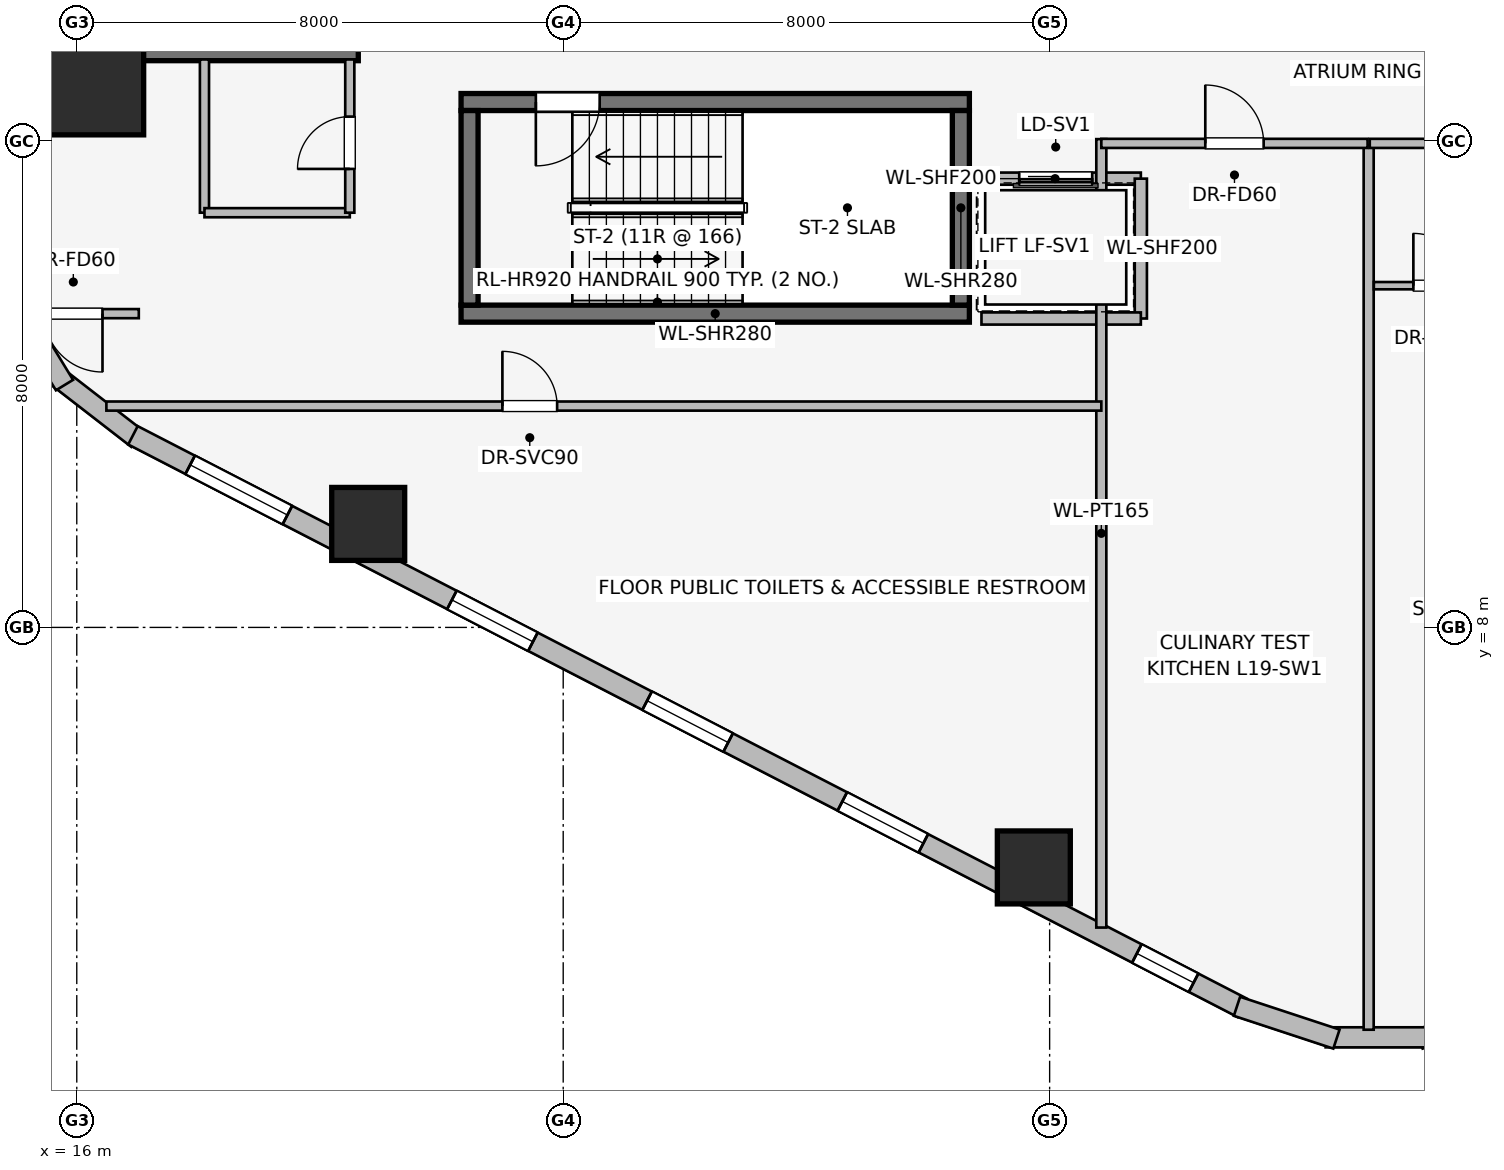
"""IFC4 building model, lengths in metres.
Left out: names, types, materials, properties, quantities, classifications, styles, units other than length and angle.
Written with IfcOpenShell. Run it as: python <this file> out.ifc"""

import sys

from ifc_helpers import new_model, si_unit, direction, frame, frame_2d, origin, origin_2d, place, context, subcontext, project, spatial, rectangle, extrude, element, fill, save


model = new_model("IFC4")
c1 = context("Model", 3, precision=1e-05, world=origin(), true_north=direction((0.0, 1.0)))
c2 = subcontext(c1, "Body", "Model", "MODEL_VIEW")
j1 = project(units=[si_unit("LENGTHUNIT", "METRE"), si_unit("PLANEANGLEUNIT", "RADIAN")], contexts=[c1])
p1 = place(None, origin())
s1 = spatial("IfcSite", under=j1, at=p1, CompositionType="ELEMENT")
p2 = place(p1, origin())
s2 = spatial("IfcBuilding", under=s1, at=p2, CompositionType="ELEMENT")
p3 = place(p2, frame((0.0, 0.0, 74.45)))
s3 = spatial("IfcBuildingStorey", under=s2, at=p3, CompositionType="ELEMENT", Elevation=74.45)
p4 = place(p3, frame((16.87, 17.46, 0.0), z_axis=(0.0, 0.0, 1.0), x_axis=(1.0, 0.0, 0.0)))
e1 = element("IfcWall", 1, at=p4, inside=s3, PredefinedType="SHEAR", context=c2, shape_type="SweptSolid", body=[
    extrude(rectangle(XDim=3.76, YDim=0.28, at=frame_2d((1.88, 0.0))), origin(), (0.0, 0.0, 1.0), 3.65),
])
p5 = place(p3, frame((22.32, 13.16, 0.0), z_axis=(0.0, 0.0, 1.0), x_axis=(1.0, 0.0, 0.0)))
e2 = element("IfcWall", 2, at=p5, inside=s3, PredefinedType="SHEAR", context=c2, shape_type="SweptSolid", body=[
    extrude(rectangle(XDim=8.36, YDim=0.28, at=frame_2d((4.18, 0.0))), origin(), (0.0, 0.0, 1.0), 3.65),
])
p6 = place(p3, frame((30.68, 16.64, 0.0), z_axis=(0.0, 0.0, 1.0), x_axis=(-1.0, 0.0, 0.0)))
e3 = element("IfcWall", 3, at=p6, inside=s3, PredefinedType="SHEAR", context=c2, shape_type="SweptSolid", body=[
    extrude(rectangle(XDim=8.36, YDim=0.28, at=frame_2d((4.18, 0.0))), origin(), (0.0, 0.0, 1.0), 3.65),
])
p7 = place(p6, frame((6.08, 0.0, 0.0)))
e4 = element("IfcOpeningElement", 4, at=p7, cuts=e3, PredefinedType="OPENING", context=c2, shape_type="SweptSolid", body=[
    extrude(rectangle(XDim=1.05, YDim=2.0, at=frame_2d((0.525, 1.0))), frame((0.0, 0.15, 0.0), z_axis=(0.0, -1.0, 0.0), x_axis=(1.0, 0.0, 0.0)), (0.0, 0.0, 1.0), 0.3),
])
for number, where, z_axis, x_axis in (
    (5, (22.46, 16.5, 0.0), (0.0, 0.0, 1.0), (0.0, -1.0, 0.0)),
    (6, (30.54, 13.3, 0.0), (0.0, 0.0, 1.0), (0.0, 1.0, 0.0)),
):
    element("IfcWall", number, at=place(p3, frame(where, z_axis=z_axis, x_axis=x_axis)), inside=s3, PredefinedType="SHEAR", context=c2, shape_type="SweptSolid", body=[
        extrude(rectangle(XDim=3.2, YDim=0.28, at=frame_2d((1.6, 0.0))), origin(), (0.0, 0.0, 1.0), 3.65),
    ])
p8 = place(p3, frame((16.3, 16.9, 0.0), z_axis=(0.0, 0.0, 1.0), x_axis=(1.0, 0.0, 0.0)))
e7 = element("IfcColumn", 7, at=p8, inside=s3, PredefinedType="COLUMN", context=c2, shape_type="SweptSolid", body=[
    extrude(rectangle(XDim=1.6, YDim=1.6, at=origin_2d()), origin(), (0.0, 0.0, 1.0), 3.65),
])
for number, where, z_axis, x_axis in (
    (8, (20.793, 9.702, 0.0), (0.0, 0.0, 1.0), (1.0, 0.0, 0.0)),
    (9, (31.74, 4.053, 0.0), (0.0, 0.0, 1.0), (1.0, 0.0, 0.0)),
):
    element("IfcColumn", number, at=place(p3, frame(where, z_axis=z_axis, x_axis=x_axis)), inside=s3, PredefinedType="COLUMN", context=c2, shape_type="SweptSolid", body=[
        extrude(rectangle(XDim=1.2, YDim=1.2, at=origin_2d()), origin(), (0.0, 0.0, 1.0), 3.65),
    ])
p9 = place(p3, frame((16.998, 11.099, 0.0), z_axis=(0.0, 0.0, 1.0), x_axis=(-0.790691856293, 0.61221433207, 0.0)))
e10 = element("IfcWall", 10, at=p9, inside=s3, PredefinedType="STANDARD", context=c2, shape_type="SweptSolid", body=[
    extrude(rectangle(XDim=1.676, YDim=0.33, at=frame_2d((0.838, 0.0))), origin(), (0.0, 0.0, 1.0), 3.39),
])
p10 = place(p3, frame((15.798, 11.985, 0.0), z_axis=(0.0, 0.0, 1.0), x_axis=(-0.520584129191, 0.853810379671, 0.0)))
e11 = element("IfcWall", 11, at=p10, inside=s3, PredefinedType="STANDARD", context=c2, shape_type="SweptSolid", body=[
    extrude(rectangle(XDim=1.677, YDim=0.33, at=frame_2d((0.838, 0.0))), origin(), (0.0, 0.0, 1.0), 3.39),
])
p11 = place(p3, frame((35.169, 1.743, 0.0), z_axis=(0.0, 0.0, 1.0), x_axis=(-0.888634413993, 0.458616264721, 0.0)))
e12 = element("IfcWall", 12, at=p11, inside=s3, PredefinedType="STANDARD", context=c2, shape_type="SweptSolid", body=[
    extrude(rectangle(XDim=20.531, YDim=0.34, at=frame_2d((10.266, 0.0))), origin(), (0.0, 0.0, 1.0), 2.684),
])
p12 = place(p11, frame((0.902, 0.0, 0.75)))
e13 = element("IfcOpeningElement", 13, at=p12, cuts=e12, PredefinedType="OPENING", context=c2, shape_type="SweptSolid", body=[
    extrude(rectangle(XDim=1.05, YDim=1.4, at=frame_2d((0.525, 0.7))), frame((0.0, 0.18, 0.0), z_axis=(0.0, -1.0, 0.0), x_axis=(1.0, 0.0, 0.0)), (0.0, 0.0, 1.0), 0.36),
])
p13 = place(p11, frame((5.903, 0.0, 0.75)))
e14 = element("IfcOpeningElement", 14, at=p13, cuts=e12, PredefinedType="OPENING", context=c2, shape_type="SweptSolid", body=[
    extrude(rectangle(XDim=1.5, YDim=1.5, at=frame_2d((0.75, 0.75))), frame((0.0, 0.18, 0.0), z_axis=(0.0, -1.0, 0.0), x_axis=(1.0, 0.0, 0.0)), (0.0, 0.0, 1.0), 0.36),
])
p14 = place(p11, frame((9.516, 0.0, 0.75)))
e15 = element("IfcOpeningElement", 15, at=p14, cuts=e12, PredefinedType="OPENING", context=c2, shape_type="SweptSolid", body=[
    extrude(rectangle(XDim=1.5, YDim=1.5, at=frame_2d((0.75, 0.75))), frame((0.0, 0.18, 0.0), z_axis=(0.0, -1.0, 0.0), x_axis=(1.0, 0.0, 0.0)), (0.0, 0.0, 1.0), 0.36),
])
p15 = place(p11, frame((13.129, 0.0, 0.75)))
e16 = element("IfcOpeningElement", 16, at=p15, cuts=e12, PredefinedType="OPENING", context=c2, shape_type="SweptSolid", body=[
    extrude(rectangle(XDim=1.5, YDim=1.5, at=frame_2d((0.75, 0.75))), frame((0.0, 0.18, 0.0), z_axis=(0.0, -1.0, 0.0), x_axis=(1.0, 0.0, 0.0)), (0.0, 0.0, 1.0), 0.36),
])
p16 = place(p11, frame((17.673, 0.0, 0.75)))
e17 = element("IfcOpeningElement", 17, at=p16, cuts=e12, PredefinedType="OPENING", context=c2, shape_type="SweptSolid", body=[
    extrude(rectangle(XDim=1.8, YDim=1.5, at=frame_2d((0.9, 0.75))), frame((0.0, 0.18, 0.0), z_axis=(0.0, -1.0, 0.0), x_axis=(1.0, 0.0, 0.0)), (0.0, 0.0, 1.0), 0.36),
])
p17 = place(p3, frame((39.719, 1.769, 0.0), z_axis=(0.0, 0.0, 1.0), x_axis=(-0.94976901097, -0.312951794691, 0.0)))
e18 = element("IfcWall", 18, at=p17, inside=s3, PredefinedType="STANDARD", context=c2, shape_type="SweptSolid", body=[
    extrude(rectangle(XDim=1.722, YDim=0.33, at=frame_2d((0.861, 0.0))), origin(), (0.0, 0.0, 1.0), 3.39),
])
p18 = place(p3, frame((38.261, 1.259, 0.0), z_axis=(0.0, 0.0, 1.0), x_axis=(-1.0, 0.0, 0.0)))
e19 = element("IfcWall", 19, at=p18, inside=s3, PredefinedType="STANDARD", context=c2, shape_type="SweptSolid", body=[
    extrude(rectangle(XDim=1.722, YDim=0.33, at=frame_2d((0.861, 0.0))), origin(), (0.0, 0.0, 1.0), 3.39),
])
p19 = place(p3, frame((36.717, 1.23, 0.0), z_axis=(0.0, 0.0, 1.0), x_axis=(-0.94976901097, 0.312951794691, 0.0)))
e20 = element("IfcWall", 20, at=p19, inside=s3, PredefinedType="STANDARD", context=c2, shape_type="SweptSolid", body=[
    extrude(rectangle(XDim=1.722, YDim=0.33, at=frame_2d((0.861, 0.0))), origin(), (0.0, 0.0, 1.0), 3.39),
])
p20 = place(p3, frame((33.5, 15.38, 0.0), z_axis=(0.0, 0.0, 1.0), x_axis=(-1.0, 0.0, 0.0)))
e21 = element("IfcWall", 21, at=p20, inside=s3, PredefinedType="PARTITIONING", context=c2, shape_type="SweptSolid", body=[
    extrude(rectangle(XDim=2.82, YDim=0.2, at=frame_2d((1.41, 0.0))), origin(), (0.0, 0.0, 1.0), 3.39),
])
p21 = place(p20, frame((0.8, 0.0, 0.0)))
e22 = element("IfcOpeningElement", 22, at=p21, cuts=e21, PredefinedType="OPENING", context=c2, shape_type="SweptSolid", body=[
    extrude(rectangle(XDim=1.2, YDim=2.2, at=frame_2d((0.6, 1.1))), frame((0.0, 0.11, 0.0), z_axis=(0.0, -1.0, 0.0), x_axis=(1.0, 0.0, 0.0)), (0.0, 0.0, 1.0), 0.22),
])
p22 = place(p3, frame((33.5, 13.08, 0.0), z_axis=(0.0, 0.0, 1.0), x_axis=(0.0, 1.0, 0.0)))
e23 = element("IfcWall", 23, at=p22, inside=s3, PredefinedType="PARTITIONING", context=c2, shape_type="SweptSolid", body=[
    extrude(rectangle(XDim=2.3, YDim=0.2, at=frame_2d((1.15, 0.0))), origin(), (0.0, 0.0, 1.0), 3.39),
])
p23 = place(p3, frame((30.879, 13.08, 0.0), z_axis=(0.0, 0.0, 1.0), x_axis=(1.0, 0.0, 0.0)))
e24 = element("IfcWall", 24, at=p23, inside=s3, PredefinedType="PARTITIONING", context=c2, shape_type="SweptSolid", body=[
    extrude(rectangle(XDim=2.621, YDim=0.2, at=frame_2d((1.311, 0.0))), origin(), (0.0, 0.0, 1.0), 3.39),
])
p24 = place(p3, frame((18.1, 17.34, 0.0), z_axis=(0.0, 0.0, 1.0), x_axis=(0.0, -1.0, 0.0)))
e25 = element("IfcWall", 25, at=p24, inside=s3, PredefinedType="PARTITIONING", context=c2, shape_type="SweptSolid", body=[
    extrude(rectangle(XDim=2.52, YDim=0.15, at=frame_2d((1.26, 0.0))), origin(), (0.0, 0.0, 1.0), 3.39),
])
p25 = place(p3, frame((18.1, 14.82, 0.0), z_axis=(0.0, 0.0, 1.0), x_axis=(1.0, 0.0, 0.0)))
e26 = element("IfcWall", 26, at=p25, inside=s3, PredefinedType="PARTITIONING", context=c2, shape_type="SweptSolid", body=[
    extrude(rectangle(XDim=2.39, YDim=0.15, at=frame_2d((1.195, 0.0))), origin(), (0.0, 0.0, 1.0), 3.39),
])
p26 = place(p3, frame((20.49, 14.82, 0.0), z_axis=(0.0, 0.0, 1.0), x_axis=(0.0, 1.0, 0.0)))
e27 = element("IfcWall", 27, at=p26, inside=s3, PredefinedType="PARTITIONING", context=c2, shape_type="SweptSolid", body=[
    extrude(rectangle(XDim=2.52, YDim=0.15, at=frame_2d((1.26, 0.0))), origin(), (0.0, 0.0, 1.0), 3.39),
])
p27 = place(p26, frame((0.72, 0.0, 0.0)))
e28 = element("IfcOpeningElement", 28, at=p27, cuts=e27, PredefinedType="OPENING", context=c2, shape_type="SweptSolid", body=[
    extrude(rectangle(XDim=0.86, YDim=2.0, at=frame_2d((0.43, 1.0))), frame((0.0, 0.085, 0.0), z_axis=(0.0, -1.0, 0.0), x_axis=(1.0, 0.0, 0.0)), (0.0, 0.0, 1.0), 0.17),
])
p28 = place(p3, frame((32.85, 3.064, 0.0), z_axis=(0.0, 0.0, 1.0), x_axis=(0.0, 1.0, 0.0)))
e29 = element("IfcWall", 29, at=p28, inside=s3, PredefinedType="PARTITIONING", context=c2, shape_type="SweptSolid", body=[
    extrude(rectangle(XDim=12.966, YDim=0.165, at=frame_2d((6.483, 0.0))), origin(), (0.0, 0.0, 1.0), 3.39),
])
p29 = place(p3, frame((16.487, 11.64, 0.0), z_axis=(0.0, 0.0, 1.0), x_axis=(1.0, 0.0, 0.0)))
e30 = element("IfcWall", 30, at=p29, inside=s3, PredefinedType="PARTITIONING", context=c2, shape_type="SweptSolid", body=[
    extrude(rectangle(XDim=16.363, YDim=0.15, at=frame_2d((8.182, 0.0))), origin(), (0.0, 0.0, 1.0), 3.39),
])
p30 = place(p29, frame((6.513, 0.0, 0.0)))
e31 = element("IfcOpeningElement", 31, at=p30, cuts=e30, PredefinedType="OPENING", context=c2, shape_type="SweptSolid", body=[
    extrude(rectangle(XDim=0.9, YDim=2.0, at=frame_2d((0.45, 1.0))), frame((0.0, 0.085, 0.0), z_axis=(0.0, -1.0, 0.0), x_axis=(1.0, 0.0, 0.0)), (0.0, 0.0, 1.0), 0.17),
])
p31 = place(p3, frame((17.02, 13.16, 0.0), z_axis=(0.0, 0.0, 1.0), x_axis=(-1.0, 0.0, 0.0)))
e32 = element("IfcWall", 32, at=p31, inside=s3, PredefinedType="PARTITIONING", context=c2, shape_type="SweptSolid", body=[
    extrude(rectangle(XDim=2.12, YDim=0.15, at=frame_2d((1.06, 0.0))), origin(), (0.0, 0.0, 1.0), 3.39),
])
p32 = place(p31, frame((0.597, 0.0, 0.0)))
e33 = element("IfcOpeningElement", 33, at=p32, cuts=e32, PredefinedType="OPENING", context=c2, shape_type="SweptSolid", body=[
    extrude(rectangle(XDim=0.96, YDim=2.0, at=frame_2d((0.48, 1.0))), frame((0.0, 0.085, 0.0), z_axis=(0.0, -1.0, 0.0), x_axis=(1.0, 0.0, 0.0)), (0.0, 0.0, 1.0), 0.17),
])
p33 = place(p3, frame((37.247, 1.384, 0.0), z_axis=(0.0, 0.0, 1.0), x_axis=(0.0, 1.0, 0.0)))
e34 = element("IfcWall", 34, at=p33, inside=s3, PredefinedType="PARTITIONING", context=c2, shape_type="SweptSolid", body=[
    extrude(rectangle(XDim=14.546, YDim=0.165, at=frame_2d((7.273, 0.0))), origin(), (0.0, 0.0, 1.0), 3.39),
])
p34 = place(p3, frame((32.85, 15.96, 0.0), z_axis=(0.0, 0.0, 1.0), x_axis=(1.0, 0.0, 0.0)))
e35 = element("IfcWall", 35, at=p34, inside=s3, PredefinedType="PARTITIONING", context=c2, shape_type="SweptSolid", body=[
    extrude(rectangle(XDim=4.379, YDim=0.15, at=frame_2d((2.189, 0.0))), origin(), (0.0, 0.0, 1.0), 3.39),
])
p35 = place(p34, frame((1.71, 0.0, 0.0)))
e36 = element("IfcOpeningElement", 36, at=p35, cuts=e35, PredefinedType="OPENING", context=c2, shape_type="SweptSolid", body=[
    extrude(rectangle(XDim=0.96, YDim=2.0, at=frame_2d((0.48, 1.0))), frame((0.0, 0.085, 0.0), z_axis=(0.0, -1.0, 0.0), x_axis=(1.0, 0.0, 0.0)), (0.0, 0.0, 1.0), 0.17),
])
p36 = place(p3, frame((37.332, 13.62, 0.0), z_axis=(0.0, 0.0, 1.0), x_axis=(1.0, 0.0, 0.0)))
e37 = element("IfcWall", 37, at=p36, inside=s3, PredefinedType="PARTITIONING", context=c2, shape_type="SweptSolid", body=[
    extrude(rectangle(XDim=2.48, YDim=0.12, at=frame_2d((1.24, 0.0))), origin(), (0.0, 0.0, 1.0), 3.39),
])
p37 = place(p36, frame((0.65, 0.0, 0.0)))
e38 = element("IfcOpeningElement", 38, at=p37, cuts=e37, PredefinedType="OPENING", context=c2, shape_type="SweptSolid", body=[
    extrude(rectangle(XDim=0.86, YDim=2.0, at=frame_2d((0.43, 1.0))), frame((0.0, 0.07, 0.0), z_axis=(0.0, -1.0, 0.0), x_axis=(1.0, 0.0, 0.0)), (0.0, 0.0, 1.0), 0.14),
])
p38 = place(p3, frame((37.265, 15.96, 0.0), z_axis=(0.0, 0.0, 1.0), x_axis=(1.0, 0.0, 0.0)))
e39 = element("IfcWall", 39, at=p38, inside=s3, PredefinedType="PARTITIONING", context=c2, shape_type="SweptSolid", body=[
    extrude(rectangle(XDim=4.832, YDim=0.15, at=frame_2d((2.416, 0.0))), origin(), (0.0, 0.0, 1.0), 3.39),
])
p39 = place(p38, frame((3.071, 0.0, 0.0)))
e40 = element("IfcOpeningElement", 40, at=p39, cuts=e39, PredefinedType="OPENING", context=c2, shape_type="SweptSolid", body=[
    extrude(rectangle(XDim=0.96, YDim=2.0, at=frame_2d((0.48, 1.0))), frame((0.0, 0.085, 0.0), z_axis=(0.0, -1.0, 0.0), x_axis=(1.0, 0.0, 0.0)), (0.0, 0.0, 1.0), 0.17),
])
p40 = place(p12, origin())
e41 = element("IfcWindow", 41, at=p40, inside=s3, PartitioningType="SINGLE_PANEL", PredefinedType="WINDOW", context=c2, shape_type="SweptSolid", body=[
    extrude(rectangle(XDim=1.05, YDim=1.4, at=frame_2d((0.525, 0.7))), frame((0.0, 0.03, 0.0), z_axis=(0.0, -1.0, 0.0), x_axis=(1.0, 0.0, 0.0)), (0.0, 0.0, 1.0), 0.06),
])
fill(e13, e41)
p41 = place(p13, origin())
e42 = element("IfcWindow", 42, at=p41, inside=s3, PartitioningType="SINGLE_PANEL", PredefinedType="WINDOW", context=c2, shape_type="SweptSolid", body=[
    extrude(rectangle(XDim=1.5, YDim=1.5, at=frame_2d((0.75, 0.75))), frame((0.0, 0.03, 0.0), z_axis=(0.0, -1.0, 0.0), x_axis=(1.0, 0.0, 0.0)), (0.0, 0.0, 1.0), 0.06),
])
fill(e14, e42)
p42 = place(p14, origin())
e43 = element("IfcWindow", 43, at=p42, inside=s3, PartitioningType="SINGLE_PANEL", PredefinedType="WINDOW", context=c2, shape_type="SweptSolid", body=[
    extrude(rectangle(XDim=1.5, YDim=1.5, at=frame_2d((0.75, 0.75))), frame((0.0, 0.03, 0.0), z_axis=(0.0, -1.0, 0.0), x_axis=(1.0, 0.0, 0.0)), (0.0, 0.0, 1.0), 0.06),
])
fill(e15, e43)
p43 = place(p15, origin())
e44 = element("IfcWindow", 44, at=p43, inside=s3, PartitioningType="SINGLE_PANEL", PredefinedType="WINDOW", context=c2, shape_type="SweptSolid", body=[
    extrude(rectangle(XDim=1.5, YDim=1.5, at=frame_2d((0.75, 0.75))), frame((0.0, 0.03, 0.0), z_axis=(0.0, -1.0, 0.0), x_axis=(1.0, 0.0, 0.0)), (0.0, 0.0, 1.0), 0.06),
])
fill(e16, e44)
p44 = place(p16, origin())
e45 = element("IfcWindow", 45, at=p44, inside=s3, PartitioningType="SINGLE_PANEL", PredefinedType="WINDOW", context=c2, shape_type="SweptSolid", body=[
    extrude(rectangle(XDim=1.8, YDim=1.5, at=frame_2d((0.9, 0.75))), frame((0.0, 0.03, 0.0), z_axis=(0.0, -1.0, 0.0), x_axis=(1.0, 0.0, 0.0)), (0.0, 0.0, 1.0), 0.06),
])
fill(e17, e45)
p45 = place(p7, origin())
e46 = element("IfcDoor", 46, at=p45, inside=s3, OperationType="SINGLE_SWING_RIGHT", PredefinedType="DOOR", context=c2, shape_type="SweptSolid", body=[
    extrude(rectangle(XDim=1.05, YDim=2.0, at=frame_2d((0.525, 1.0))), frame((0.0, 0.025, 0.0), z_axis=(0.0, -1.0, 0.0), x_axis=(1.0, 0.0, 0.0)), (0.0, 0.0, 1.0), 0.05),
])
fill(e4, e46)
p46 = place(p21, origin())
e47 = element("IfcDoor", 47, at=p46, inside=s3, OperationType="SLIDING_TO_RIGHT", PredefinedType="DOOR", context=c2, shape_type="SweptSolid", body=[
    extrude(rectangle(XDim=1.2, YDim=2.2, at=frame_2d((0.6, 1.1))), frame((0.0, 0.025, 0.0), z_axis=(0.0, -1.0, 0.0), x_axis=(1.0, 0.0, 0.0)), (0.0, 0.0, 1.0), 0.05),
])
fill(e22, e47)
p47 = place(p27, origin())
e48 = element("IfcDoor", 48, at=p47, inside=s3, OperationType="SINGLE_SWING_LEFT", PredefinedType="DOOR", context=c2, shape_type="SweptSolid", body=[
    extrude(rectangle(XDim=0.86, YDim=2.0, at=frame_2d((0.43, 1.0))), frame((0.0, 0.025, 0.0), z_axis=(0.0, -1.0, 0.0), x_axis=(1.0, 0.0, 0.0)), (0.0, 0.0, 1.0), 0.05),
])
fill(e28, e48)
p48 = place(p30, origin())
e49 = element("IfcDoor", 49, at=p48, inside=s3, OperationType="SINGLE_SWING_LEFT", PredefinedType="DOOR", context=c2, shape_type="SweptSolid", body=[
    extrude(rectangle(XDim=0.9, YDim=2.0, at=frame_2d((0.45, 1.0))), frame((0.0, 0.025, 0.0), z_axis=(0.0, -1.0, 0.0), x_axis=(1.0, 0.0, 0.0)), (0.0, 0.0, 1.0), 0.05),
])
fill(e31, e49)
p49 = place(p32, origin())
e50 = element("IfcDoor", 50, at=p49, inside=s3, OperationType="SINGLE_SWING_LEFT", PredefinedType="DOOR", context=c2, shape_type="SweptSolid", body=[
    extrude(rectangle(XDim=0.96, YDim=2.0, at=frame_2d((0.48, 1.0))), frame((0.0, 0.025, 0.0), z_axis=(0.0, -1.0, 0.0), x_axis=(1.0, 0.0, 0.0)), (0.0, 0.0, 1.0), 0.05),
])
fill(e33, e50)
p50 = place(p35, origin())
e51 = element("IfcDoor", 51, at=p50, inside=s3, OperationType="SINGLE_SWING_LEFT", PredefinedType="DOOR", context=c2, shape_type="SweptSolid", body=[
    extrude(rectangle(XDim=0.96, YDim=2.0, at=frame_2d((0.48, 1.0))), frame((0.0, 0.025, 0.0), z_axis=(0.0, -1.0, 0.0), x_axis=(1.0, 0.0, 0.0)), (0.0, 0.0, 1.0), 0.05),
])
fill(e36, e51)
p51 = place(p37, origin())
e52 = element("IfcDoor", 52, at=p51, inside=s3, OperationType="SINGLE_SWING_LEFT", PredefinedType="DOOR", context=c2, shape_type="SweptSolid", body=[
    extrude(rectangle(XDim=0.86, YDim=2.0, at=frame_2d((0.43, 1.0))), frame((0.0, 0.025, 0.0), z_axis=(0.0, -1.0, 0.0), x_axis=(1.0, 0.0, 0.0)), (0.0, 0.0, 1.0), 0.05),
])
fill(e38, e52)
save(model, sys.argv[1])
